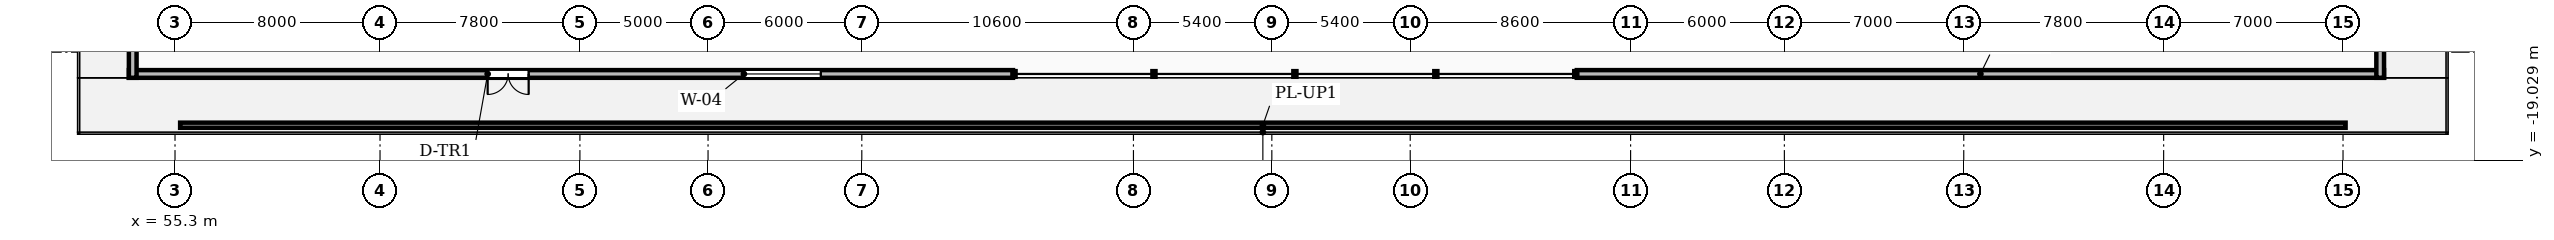
"""IFC4 building model, lengths in metres.
Left out: names, types, materials, properties, quantities, classifications, styles, units other than length and angle.
Written with IfcOpenShell. Run it as: python <this file> out.ifc"""

import sys

from ifc_helpers import new_model, si_unit, direction, frame, frame_2d, origin, place, context, subcontext, project, spatial, rectangle, extrude, element, fill, save


model = new_model("IFC4")
c1 = context("Model", 3, precision=1e-05, world=origin(), true_north=direction((0.0, 1.0)))
c2 = subcontext(c1, "Body", "Model", "MODEL_VIEW")
j1 = project(units=[si_unit("LENGTHUNIT", "METRE"), si_unit("PLANEANGLEUNIT", "RADIAN")], contexts=[c1])
p1 = place(None, origin())
s1 = spatial("IfcSite", under=j1, at=p1, CompositionType="ELEMENT")
p2 = place(p1, origin())
s2 = spatial("IfcBuilding", under=s1, at=p2, CompositionType="ELEMENT")
p3 = place(p2, frame((0.0, 0.0, 19.0)))
s3 = spatial("IfcBuildingStorey", under=s2, at=p3, CompositionType="ELEMENT", Elevation=19.0)
p4 = place(p3, frame((53.5, -15.65, 0.0), z_axis=(0.0, 0.0, 1.0), x_axis=(1.0, 0.0, 0.0)))
e1 = element("IfcWall", 1, at=p4, inside=s3, PredefinedType="STANDARD", context=c2, shape_type="SweptSolid", body=[
    extrude(rectangle(XDim=34.5, YDim=0.3, at=frame_2d((17.25, 0.0))), origin(), (0.0, 0.0, 1.0), 4.68),
])
p5 = place(p4, frame((14.0, 0.0, 0.0)))
e2 = element("IfcOpeningElement", 2, at=p5, cuts=e1, PredefinedType="OPENING", context=c2, shape_type="SweptSolid", body=[
    extrude(rectangle(XDim=1.6, YDim=2.2, at=frame_2d((0.8, 1.1))), frame((0.0, 0.16, 0.0), z_axis=(0.0, -1.0, 0.0), x_axis=(1.0, 0.0, 0.0)), (0.0, 0.0, 1.0), 0.32),
])
p6 = place(p4, frame((24.0, 0.0, 0.9)))
e3 = element("IfcOpeningElement", 3, at=p6, cuts=e1, PredefinedType="OPENING", context=c2, shape_type="SweptSolid", body=[
    extrude(rectangle(XDim=3.0, YDim=2.6, at=frame_2d((1.5, 1.3))), frame((0.0, 0.16, 0.0), z_axis=(0.0, -1.0, 0.0), x_axis=(1.0, 0.0, 0.0)), (0.0, 0.0, 1.0), 0.32),
])
p7 = place(p3, frame((110.0, -15.65, 0.0), z_axis=(0.0, 0.0, 1.0), x_axis=(1.0, 0.0, 0.0)))
e4 = element("IfcWall", 4, at=p7, inside=s3, PredefinedType="STANDARD", context=c2, shape_type="SweptSolid", body=[
    extrude(rectangle(XDim=31.5, YDim=0.3, at=frame_2d((15.75, 0.0))), origin(), (0.0, 0.0, 1.0), 4.68),
])
p8 = place(p3, frame((53.65, 99.2, 0.0), z_axis=(0.0, 0.0, 1.0), x_axis=(0.0, -1.0, 0.0)))
e5 = element("IfcWall", 5, at=p8, inside=s3, PredefinedType="STANDARD", context=c2, shape_type="SweptSolid", body=[
    extrude(rectangle(XDim=115.0, YDim=0.3, at=frame_2d((57.5, 0.0))), origin(), (0.0, 0.0, 1.0), 4.68),
])
p9 = place(p8, frame((12.0, 0.0, 0.0)))
e6 = element("IfcOpeningElement", 6, at=p9, cuts=e5, PredefinedType="OPENING", context=c2, shape_type="SweptSolid", body=[
    extrude(rectangle(XDim=1.6, YDim=2.2, at=frame_2d((0.8, 1.1))), frame((0.0, 0.16, 0.0), z_axis=(0.0, -1.0, 0.0), x_axis=(1.0, 0.0, 0.0)), (0.0, 0.0, 1.0), 0.32),
])
p10 = place(p3, frame((141.35, -15.8, 0.0), z_axis=(0.0, 0.0, 1.0), x_axis=(0.0, 1.0, 0.0)))
e7 = element("IfcWall", 7, at=p10, inside=s3, PredefinedType="STANDARD", context=c2, shape_type="SweptSolid", body=[
    extrude(rectangle(XDim=115.0, YDim=0.3, at=frame_2d((57.5, 0.0))), origin(), (0.0, 0.0, 1.0), 4.68),
])
p11 = place(p10, frame((20.0, 0.0, 0.0)))
e8 = element("IfcOpeningElement", 8, at=p11, cuts=e7, PredefinedType="OPENING", context=c2, shape_type="SweptSolid", body=[
    extrude(rectangle(XDim=1.6, YDim=2.2, at=frame_2d((0.8, 1.1))), frame((0.0, 0.16, 0.0), z_axis=(0.0, -1.0, 0.0), x_axis=(1.0, 0.0, 0.0)), (0.0, 0.0, 1.0), 0.32),
])
p12 = place(p3, frame((55.5, -17.65, 0.0), z_axis=(0.0, 0.0, 1.0), x_axis=(1.0, 0.0, 0.0)))
e9 = element("IfcWall", 9, at=p12, inside=s3, PredefinedType="PARAPET", context=c2, shape_type="SweptSolid", body=[
    extrude(rectangle(XDim=84.5, YDim=0.2, at=frame_2d((42.25, 0.0))), origin(), (0.0, 0.0, 1.0), 0.65),
])
p13 = place(p5, frame((1.6, 0.0, 0.0), z_axis=(0.0, 0.0, 1.0), x_axis=(-1.0, 0.0, 0.0)))
e10 = element("IfcDoor", 10, at=p13, inside=s3, OperationType="DOUBLE_DOOR_SINGLE_SWING", PredefinedType="DOOR", context=c2, shape_type="SweptSolid", body=[
    extrude(rectangle(XDim=1.6, YDim=2.2, at=frame_2d((0.8, 1.1))), frame((0.0, 0.025, 0.0), z_axis=(0.0, -1.0, 0.0), x_axis=(1.0, 0.0, 0.0)), (0.0, 0.0, 1.0), 0.05),
])
fill(e2, e10)
p14 = place(p6, origin())
e11 = element("IfcWindow", 11, at=p14, inside=s3, PartitioningType="TRIPLE_PANEL_VERTICAL", PredefinedType="WINDOW", context=c2, shape_type="SweptSolid", body=[
    extrude(rectangle(XDim=3.0, YDim=2.6, at=frame_2d((1.5, 1.3))), frame((0.0, 0.03, 0.0), z_axis=(0.0, -1.0, 0.0), x_axis=(1.0, 0.0, 0.0)), (0.0, 0.0, 1.0), 0.06),
])
fill(e3, e11)
save(model, sys.argv[1])
